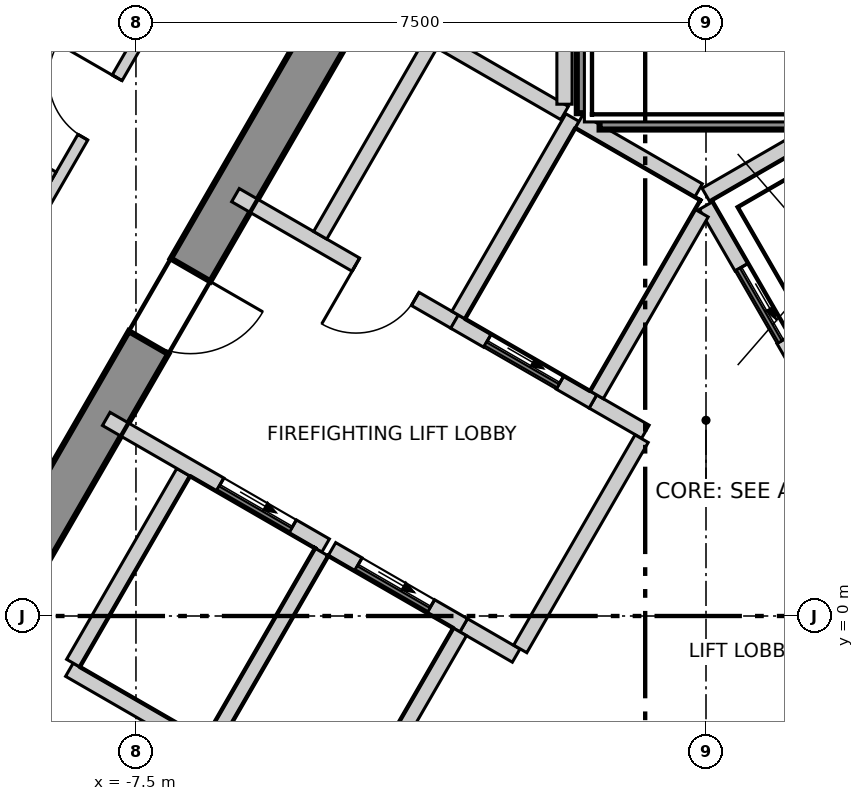
"""IFC4 building model, lengths in metres.
Left out: names, types, materials, properties, quantities, classifications, styles, units other than length and angle.
Written with IfcOpenShell. Run it as: python <this file> out.ifc"""

import sys

from ifc_helpers import new_model, si_unit, direction, frame, frame_2d, origin, place, context, subcontext, project, spatial, polyline, rectangle, outline, extrude, element, fill, save


model = new_model("IFC4")
c1 = context("Model", 3, precision=1e-05, world=origin(), true_north=direction((0.0, 1.0)))
c2 = subcontext(c1, "Body", "Model", "MODEL_VIEW")
j1 = project(units=[si_unit("LENGTHUNIT", "METRE"), si_unit("PLANEANGLEUNIT", "RADIAN")], contexts=[c1])
p1 = place(None, origin())
s1 = spatial("IfcSite", under=j1, at=p1, CompositionType="ELEMENT")
p2 = place(p1, origin())
s2 = spatial("IfcBuilding", under=s1, at=p2, CompositionType="ELEMENT")
p3 = place(p2, frame((0.0, 0.0, 311.5)))
s3 = spatial("IfcBuildingStorey", under=s2, at=p3, CompositionType="ELEMENT", Elevation=311.5)
p4 = place(p3, frame((-1.732, 13.3, -0.3), z_axis=(0.0, 0.0, 1.0), x_axis=(-0.500000539815, -0.866025092122, 0.0)))
e1 = element("IfcWall", 1, at=p4, inside=s3, PredefinedType="SHEAR", context=c2, shape_type="SweptSolid", body=[
    extrude(outline(polyline([(-0.173, -0.3), (1.795, -0.3), (3.763, -0.3), (5.732, -0.3), (7.7, -0.3), (9.668, -0.301), (11.637, -0.301), (13.605, -0.301), (15.573, -0.301), (17.542, -0.301), (19.51, -0.301), (21.478, -0.301), (21.131, 0.3), (19.226, 0.3), (17.321, 0.3), (15.415, 0.3), (13.51, 0.3), (11.605, 0.3), (9.699, 0.3), (7.794, 0.3), (5.889, 0.3), (3.984, 0.3), (2.078, 0.3), (0.173, 0.3), (-0.173, -0.3)])), origin(), (0.0, 0.0, 1.0), 3.6),
])
p5 = place(p4, frame((10.102, 0.0, 0.3)))
e2 = element("IfcOpeningElement", 2, at=p5, cuts=e1, PredefinedType="OPENING", context=c2, shape_type="SweptSolid", body=[
    extrude(rectangle(XDim=1.1, YDim=2.1, at=frame_2d((0.55, 1.05))), frame((0.0, 0.31, 0.0), z_axis=(0.0, -1.0, 0.0), x_axis=(1.0, 0.0, 0.0)), (0.0, 0.0, 1.0), 0.621),
])
p6 = place(p4, frame((16.378, 0.0, 0.3)))
e3 = element("IfcOpeningElement", 3, at=p6, cuts=e1, PredefinedType="OPENING", context=c2, shape_type="SweptSolid", body=[
    extrude(rectangle(XDim=0.9, YDim=2.1, at=frame_2d((0.45, 1.05))), frame((0.0, 0.31, 0.0), z_axis=(0.0, -1.0, 0.0), x_axis=(1.0, 0.0, 0.0)), (0.0, 0.0, 1.0), 0.621),
])
p7 = place(p4, frame((4.106, 0.0, 0.3)))
e4 = element("IfcOpeningElement", 4, at=p7, cuts=e1, PredefinedType="OPENING", context=c2, shape_type="SweptSolid", body=[
    extrude(rectangle(XDim=1.0, YDim=2.1, at=frame_2d((0.5, 1.05))), frame((0.0, 0.31, 0.0), z_axis=(0.0, -1.0, 0.0), x_axis=(1.0, 0.0, 0.0)), (0.0, 0.0, 1.0), 0.621),
])
p8 = place(p3, frame((-2.412, 26.948, 0.0), z_axis=(0.0, 0.0, 1.0), x_axis=(-0.500002044679, -0.866024223285, 0.0)))
e5 = element("IfcWall", 5, at=p8, inside=s3, PredefinedType="ELEMENTEDWALL", context=c2, shape_type="SweptSolid", body=[
    extrude(rectangle(XDim=44.243, YDim=0.2, at=frame_2d((22.122, 0.0))), origin(), (0.0, 0.0, 1.0), 3.3),
])
p9 = place(p8, frame((2.056, 0.0, 0.9)))
e6 = element("IfcOpeningElement", 6, at=p9, cuts=e5, PredefinedType="OPENING", context=c2, shape_type="SweptSolid", body=[
    extrude(rectangle(XDim=3.7, YDim=2.2, at=frame_2d((1.85, 1.1))), frame((0.0, 0.11, 0.0), z_axis=(0.0, -1.0, 0.0), x_axis=(1.0, 0.0, 0.0)), (0.0, 0.0, 1.0), 0.22),
])
p10 = place(p8, frame((7.263, 0.0, 0.9)))
e7 = element("IfcOpeningElement", 7, at=p10, cuts=e5, PredefinedType="OPENING", context=c2, shape_type="SweptSolid", body=[
    extrude(rectangle(XDim=3.7, YDim=2.2, at=frame_2d((1.85, 1.1))), frame((0.0, 0.11, 0.0), z_axis=(0.0, -1.0, 0.0), x_axis=(1.0, 0.0, 0.0)), (0.0, 0.0, 1.0), 0.22),
])
p11 = place(p8, frame((12.471, 0.0, 0.9)))
e8 = element("IfcOpeningElement", 8, at=p11, cuts=e5, PredefinedType="OPENING", context=c2, shape_type="SweptSolid", body=[
    extrude(rectangle(XDim=3.7, YDim=2.2, at=frame_2d((1.85, 1.1))), frame((0.0, 0.11, 0.0), z_axis=(0.0, -1.0, 0.0), x_axis=(1.0, 0.0, 0.0)), (0.0, 0.0, 1.0), 0.22),
])
p12 = place(p8, frame((17.678, 0.0, 0.9)))
e9 = element("IfcOpeningElement", 9, at=p12, cuts=e5, PredefinedType="OPENING", context=c2, shape_type="SweptSolid", body=[
    extrude(rectangle(XDim=3.7, YDim=2.2, at=frame_2d((1.85, 1.1))), frame((0.0, 0.11, 0.0), z_axis=(0.0, -1.0, 0.0), x_axis=(1.0, 0.0, 0.0)), (0.0, 0.0, 1.0), 0.22),
])
p13 = place(p8, frame((22.885, 0.0, 0.9)))
e10 = element("IfcOpeningElement", 10, at=p13, cuts=e5, PredefinedType="OPENING", context=c2, shape_type="SweptSolid", body=[
    extrude(rectangle(XDim=3.7, YDim=2.2, at=frame_2d((1.85, 1.1))), frame((0.0, 0.11, 0.0), z_axis=(0.0, -1.0, 0.0), x_axis=(1.0, 0.0, 0.0)), (0.0, 0.0, 1.0), 0.22),
])
p14 = place(p8, frame((28.092, 0.0, 0.9)))
e11 = element("IfcOpeningElement", 11, at=p14, cuts=e5, PredefinedType="OPENING", context=c2, shape_type="SweptSolid", body=[
    extrude(rectangle(XDim=3.7, YDim=2.2, at=frame_2d((1.85, 1.1))), frame((0.0, 0.11, 0.0), z_axis=(0.0, -1.0, 0.0), x_axis=(1.0, 0.0, 0.0)), (0.0, 0.0, 1.0), 0.22),
])
p15 = place(p8, frame((33.3, 0.0, 0.9)))
e12 = element("IfcOpeningElement", 12, at=p15, cuts=e5, PredefinedType="OPENING", context=c2, shape_type="SweptSolid", body=[
    extrude(rectangle(XDim=3.7, YDim=2.2, at=frame_2d((1.85, 1.1))), frame((0.0, 0.11, 0.0), z_axis=(0.0, -1.0, 0.0), x_axis=(1.0, 0.0, 0.0)), (0.0, 0.0, 1.0), 0.22),
])
p16 = place(p8, frame((38.507, 0.0, 0.9)))
e13 = element("IfcOpeningElement", 13, at=p16, cuts=e5, PredefinedType="OPENING", context=c2, shape_type="SweptSolid", body=[
    extrude(rectangle(XDim=3.7, YDim=2.2, at=frame_2d((1.85, 1.1))), frame((0.0, 0.11, 0.0), z_axis=(0.0, -1.0, 0.0), x_axis=(1.0, 0.0, 0.0)), (0.0, 0.0, 1.0), 0.22),
])
p17 = place(p3, frame((-17.678, -10.12, 0.0), z_axis=(0.0, 0.0, 1.0), x_axis=(0.49998824015, 0.86603219323, 0.0)))
e14 = element("IfcWall", 14, at=p17, inside=s3, PredefinedType="PARTITIONING", context=c2, shape_type="SweptSolid", body=[
    extrude(rectangle(XDim=35.357, YDim=0.15, at=frame_2d((17.678, 0.0))), origin(), (0.0, 0.0, 1.0), 3.3),
])
p18 = place(p17, frame((28.607, 0.0, 0.0)))
e15 = element("IfcOpeningElement", 15, at=p18, cuts=e14, PredefinedType="OPENING", context=c2, shape_type="SweptSolid", body=[
    extrude(rectangle(XDim=1.0, YDim=2.1, at=frame_2d((0.5, 1.05))), frame((0.0, 0.085, 0.0), z_axis=(0.0, -1.0, 0.0), x_axis=(1.0, 0.0, 0.0)), (0.0, 0.0, 1.0), 0.17),
])
p19 = place(p17, frame((13.86, 0.0, 0.0)))
e16 = element("IfcOpeningElement", 16, at=p19, cuts=e14, PredefinedType="OPENING", context=c2, shape_type="SweptSolid", body=[
    extrude(rectangle(XDim=1.0, YDim=2.1, at=frame_2d((0.5, 1.05))), frame((0.0, 0.085, 0.0), z_axis=(0.0, -1.0, 0.0), x_axis=(1.0, 0.0, 0.0)), (0.0, 0.0, 1.0), 0.17),
])
p20 = place(p17, frame((18.96, 0.0, 0.0)))
e17 = element("IfcOpeningElement", 17, at=p20, cuts=e14, PredefinedType="OPENING", context=c2, shape_type="SweptSolid", body=[
    extrude(rectangle(XDim=0.9, YDim=2.1, at=frame_2d((0.45, 1.05))), frame((0.0, 0.085, 0.0), z_axis=(0.0, -1.0, 0.0), x_axis=(1.0, 0.0, 0.0)), (0.0, 0.0, 1.0), 0.17),
])
p21 = place(p17, frame((16.86, 0.0, 0.0)))
e18 = element("IfcOpeningElement", 18, at=p21, cuts=e14, PredefinedType="OPENING", context=c2, shape_type="SweptSolid", body=[
    extrude(rectangle(XDim=0.9, YDim=2.1, at=frame_2d((0.45, 1.05))), frame((0.0, 0.085, 0.0), z_axis=(0.0, -1.0, 0.0), x_axis=(1.0, 0.0, 0.0)), (0.0, 0.0, 1.0), 0.17),
])
p22 = place(p17, frame((8.146, 0.0, 0.0)))
e19 = element("IfcOpeningElement", 19, at=p22, cuts=e14, PredefinedType="OPENING", context=c2, shape_type="SweptSolid", body=[
    extrude(rectangle(XDim=1.0, YDim=2.1, at=frame_2d((0.5, 1.05))), frame((0.0, 0.085, 0.0), z_axis=(0.0, -1.0, 0.0), x_axis=(1.0, 0.0, 0.0)), (0.0, 0.0, 1.0), 0.17),
])
p23 = place(p17, frame((3.038, 0.0, 0.0)))
e20 = element("IfcOpeningElement", 20, at=p23, cuts=e14, PredefinedType="OPENING", context=c2, shape_type="SweptSolid", body=[
    extrude(rectangle(XDim=1.0, YDim=2.1, at=frame_2d((0.5, 1.05))), frame((0.0, 0.085, 0.0), z_axis=(0.0, -1.0, 0.0), x_axis=(1.0, 0.0, 0.0)), (0.0, 0.0, 1.0), 0.17),
])
p24 = place(p3, frame((-10.759, 7.028, 0.0), z_axis=(0.0, 0.0, 1.0), x_axis=(0.866083422639, -0.499899494929, 0.0)))
e21 = element("IfcWall", 21, at=p24, inside=s3, PredefinedType="PARTITIONING", context=c2, shape_type="SweptSolid", body=[
    extrude(rectangle(XDim=2.507, YDim=0.15, at=frame_2d((1.253, 0.0))), origin(), (0.0, 0.0, 1.0), 3.3),
])
p25 = place(p3, frame((0.075, 20.37, 0.0), z_axis=(0.0, 0.0, 1.0), x_axis=(0.500006672087, -0.866021551619, 0.0)))
e22 = element("IfcWall", 22, at=p25, inside=s3, PredefinedType="PARTITIONING", context=c2, shape_type="SweptSolid", body=[
    extrude(rectangle(XDim=35.27, YDim=0.15, at=frame_2d((17.635, 0.0))), origin(), (0.0, 0.0, 1.0), 3.3),
])
p26 = place(p25, frame((31.206, 0.0, 0.0)))
e23 = element("IfcOpeningElement", 23, at=p26, cuts=e22, PredefinedType="OPENING", context=c2, shape_type="SweptSolid", body=[
    extrude(rectangle(XDim=1.0, YDim=2.1, at=frame_2d((0.5, 1.05))), frame((0.0, 0.085, 0.0), z_axis=(0.0, -1.0, 0.0), x_axis=(1.0, 0.0, 0.0)), (0.0, 0.0, 1.0), 0.17),
])
p27 = place(p25, frame((19.968, 0.0, 0.0)))
e24 = element("IfcOpeningElement", 24, at=p27, cuts=e22, PredefinedType="OPENING", context=c2, shape_type="SweptSolid", body=[
    extrude(rectangle(XDim=1.0, YDim=2.1, at=frame_2d((0.5, 1.05))), frame((0.0, 0.085, 0.0), z_axis=(0.0, -1.0, 0.0), x_axis=(1.0, 0.0, 0.0)), (0.0, 0.0, 1.0), 0.17),
])
p28 = place(p25, frame((13.353, 0.0, 0.0)))
e25 = element("IfcOpeningElement", 25, at=p28, cuts=e22, PredefinedType="OPENING", context=c2, shape_type="SweptSolid", body=[
    extrude(rectangle(XDim=1.0, YDim=2.1, at=frame_2d((0.5, 1.05))), frame((0.0, 0.085, 0.0), z_axis=(0.0, -1.0, 0.0), x_axis=(1.0, 0.0, 0.0)), (0.0, 0.0, 1.0), 0.17),
])
p29 = place(p25, frame((7.746, 0.0, 0.0)))
e26 = element("IfcOpeningElement", 26, at=p29, cuts=e22, PredefinedType="OPENING", context=c2, shape_type="SweptSolid", body=[
    extrude(rectangle(XDim=1.0, YDim=2.1, at=frame_2d((0.5, 1.05))), frame((0.0, 0.085, 0.0), z_axis=(0.0, -1.0, 0.0), x_axis=(1.0, 0.0, 0.0)), (0.0, 0.0, 1.0), 0.17),
])
p30 = place(p25, frame((3.038, 0.0, 0.0)))
e27 = element("IfcOpeningElement", 27, at=p30, cuts=e22, PredefinedType="OPENING", context=c2, shape_type="SweptSolid", body=[
    extrude(rectangle(XDim=1.0, YDim=2.1, at=frame_2d((0.5, 1.05))), frame((0.0, 0.085, 0.0), z_axis=(0.0, -1.0, 0.0), x_axis=(1.0, 0.0, 0.0)), (0.0, 0.0, 1.0), 0.17),
])
p31 = place(p3, frame((-8.376, -0.707, 0.0), z_axis=(0.0, 0.0, 1.0), x_axis=(0.866067520717, -0.499927044236, 0.0)))
e28 = element("IfcWall", 28, at=p31, inside=s3, PredefinedType="SOLIDWALL", context=c2, shape_type="SweptSolid", body=[
    extrude(rectangle(XDim=2.1, YDim=0.2, at=frame_2d((1.05, 0.0))), origin(), (0.0, 0.0, 1.0), 3.3),
])
p32 = place(p3, frame((-8.326, -0.62, 0.0), z_axis=(0.0, 0.0, 1.0), x_axis=(0.500023687443, 0.866011727401, 0.0)))
e29 = element("IfcWall", 29, at=p32, inside=s3, PredefinedType="SOLIDWALL", context=c2, shape_type="SweptSolid", body=[
    extrude(rectangle(XDim=2.9, YDim=0.2, at=frame_2d((1.45, 0.0))), origin(), (0.0, 0.0, 1.0), 3.3),
])
p33 = place(p3, frame((-0.002, 5.541, 0.0), z_axis=(0.0, 0.0, 1.0), x_axis=(0.86600155993, 0.500041296494, 0.0)))
e30 = element("IfcWall", 30, at=p33, inside=s3, PredefinedType="SOLIDWALL", context=c2, shape_type="SweptSolid", body=[
    extrude(rectangle(XDim=4.132, YDim=0.2, at=frame_2d((2.066, 0.0))), origin(), (0.0, 0.0, 1.0), 3.3),
])
p34 = place(p3, frame((0.0, 5.4, 0.0), z_axis=(0.0, 0.0, 1.0), x_axis=(0.500103862429, -0.865965430478, 0.0)))
e31 = element("IfcWall", 31, at=p34, inside=s3, PredefinedType="SOLIDWALL", context=c2, shape_type="SweptSolid", body=[
    extrude(rectangle(XDim=2.973, YDim=0.2, at=frame_2d((1.487, 0.0))), origin(), (0.0, 0.0, 1.0), 3.3),
])
p35 = place(p34, frame((0.937, 0.0, 0.0)))
e32 = element("IfcOpeningElement", 32, at=p35, cuts=e31, PredefinedType="OPENING", context=c2, shape_type="SweptSolid", body=[
    extrude(rectangle(XDim=1.1, YDim=2.1, at=frame_2d((0.55, 1.05))), frame((0.0, 0.11, 0.0), z_axis=(0.0, -1.0, 0.0), x_axis=(1.0, 0.0, 0.0)), (0.0, 0.0, 1.0), 0.22),
])
p36 = place(p3, frame((-7.891, 2.593, 0.0), z_axis=(0.0, 0.0, 1.0), x_axis=(0.866070917804, -0.499921159118, 0.0)))
e33 = element("IfcWall", 33, at=p36, inside=s3, PredefinedType="SOLIDWALL", context=c2, shape_type="SweptSolid", body=[
    extrude(rectangle(XDim=3.333, YDim=0.2, at=frame_2d((1.666, 0.0))), origin(), (0.0, 0.0, 1.0), 3.3),
])
p37 = place(p36, frame((1.73, 0.0, 0.0)))
e34 = element("IfcOpeningElement", 34, at=p37, cuts=e33, PredefinedType="OPENING", context=c2, shape_type="SweptSolid", body=[
    extrude(rectangle(XDim=1.1, YDim=2.1, at=frame_2d((0.55, 1.05))), frame((0.0, 0.11, 0.0), z_axis=(0.0, -1.0, 0.0), x_axis=(1.0, 0.0, 0.0)), (0.0, 0.0, 1.0), 0.22),
])
p38 = place(p3, frame((-3.188, -0.122, 0.0), z_axis=(0.0, 0.0, 1.0), x_axis=(0.865705793592, -0.50055317294, 0.0)))
e35 = element("IfcWall", 35, at=p38, inside=s3, PredefinedType="SOLIDWALL", context=c2, shape_type="SweptSolid", body=[
    extrude(rectangle(XDim=0.797, YDim=0.2, at=frame_2d((0.398, 0.0))), origin(), (0.0, 0.0, 1.0), 3.3),
])
p39 = place(p3, frame((-6.191, 5.537, 0.0), z_axis=(0.0, 0.0, 1.0), x_axis=(0.866052607023, -0.499952879648, 0.0)))
e36 = element("IfcWall", 36, at=p39, inside=s3, PredefinedType="SOLIDWALL", context=c2, shape_type="SweptSolid", body=[
    extrude(rectangle(XDim=3.332, YDim=0.2, at=frame_2d((1.666, 0.0))), origin(), (0.0, 0.0, 1.0), 3.3),
])
p40 = place(p39, frame((1.83, 0.0, 0.0)))
e37 = element("IfcOpeningElement", 37, at=p40, cuts=e36, PredefinedType="OPENING", context=c2, shape_type="SweptSolid", body=[
    extrude(rectangle(XDim=0.9, YDim=2.1, at=frame_2d((0.45, 1.05))), frame((0.0, 0.11, 0.0), z_axis=(0.0, -1.0, 0.0), x_axis=(1.0, 0.0, 0.0)), (0.0, 0.0, 1.0), 0.22),
])
p41 = place(p3, frame((-1.488, 2.822, 0.0), z_axis=(0.0, 0.0, 1.0), x_axis=(0.866236612152, -0.499633997809, 0.0)))
e38 = element("IfcWall", 38, at=p41, inside=s3, PredefinedType="SOLIDWALL", context=c2, shape_type="SweptSolid", body=[
    extrude(rectangle(XDim=0.796, YDim=0.2, at=frame_2d((0.398, 0.0))), origin(), (0.0, 0.0, 1.0), 3.3),
])
p42 = place(p3, frame((-5.076, 5.009, 0.0), z_axis=(0.0, 0.0, 1.0), x_axis=(0.50002537861, 0.866010750942, 0.0)))
e39 = element("IfcWall", 39, at=p42, inside=s3, PredefinedType="SOLIDWALL", context=c2, shape_type="SweptSolid", body=[
    extrude(rectangle(XDim=3.0, YDim=0.2, at=frame_2d((1.5, 0.0))), origin(), (0.0, 0.0, 1.0), 3.3),
])
p43 = place(p3, frame((-3.489, 7.557, 0.0), z_axis=(0.0, 0.0, 1.0), x_axis=(0.866012558475, -0.500022248069, 0.0)))
e40 = element("IfcWall", 40, at=p43, inside=s3, PredefinedType="SOLIDWALL", context=c2, shape_type="SweptSolid", body=[
    extrude(rectangle(XDim=1.88, YDim=0.2, at=frame_2d((0.94, 0.0))), origin(), (0.0, 0.0, 1.0), 3.3),
])
p44 = place(p3, frame((-2.444, -0.433, 0.0), z_axis=(0.0, 0.0, 1.0), x_axis=(0.500035624827, 0.866004834804, 0.0)))
e41 = element("IfcWall", 41, at=p44, inside=s3, PredefinedType="SOLIDWALL", context=c2, shape_type="SweptSolid", body=[
    extrude(rectangle(XDim=3.194, YDim=0.2, at=frame_2d((1.597, 0.0))), origin(), (0.0, 0.0, 1.0), 3.3),
])
p45 = place(p3, frame((-6.507, -1.67, 0.0), z_axis=(0.0, 0.0, 1.0), x_axis=(0.50012328804, 0.865954211699, 0.0)))
e42 = element("IfcWall", 42, at=p45, inside=s3, PredefinedType="SOLIDWALL", context=c2, shape_type="SweptSolid", body=[
    extrude(rectangle(XDim=2.9, YDim=0.2, at=frame_2d((1.45, 0.0))), origin(), (0.0, 0.0, 1.0), 3.3),
])
p46 = place(p3, frame((-4.922, 0.879, 0.0), z_axis=(0.0, 0.0, 1.0), x_axis=(0.866073918653, -0.499915960366, 0.0)))
e43 = element("IfcWall", 43, at=p46, inside=s3, PredefinedType="SOLIDWALL", context=c2, shape_type="SweptSolid", body=[
    extrude(rectangle(XDim=2.002, YDim=0.2, at=frame_2d((1.001, 0.0))), origin(), (0.0, 0.0, 1.0), 3.3),
])
p47 = place(p46, frame((0.402, 0.0, 0.0)))
e44 = element("IfcOpeningElement", 44, at=p47, cuts=e43, PredefinedType="OPENING", context=c2, shape_type="SweptSolid", body=[
    extrude(rectangle(XDim=1.1, YDim=2.1, at=frame_2d((0.55, 1.05))), frame((0.0, 0.11, 0.0), z_axis=(0.0, -1.0, 0.0), x_axis=(1.0, 0.0, 0.0)), (0.0, 0.0, 1.0), 0.22),
])
p48 = place(p3, frame((-4.619, -2.6, 0.0), z_axis=(0.0, 0.0, 1.0), x_axis=(0.50009492287, 0.865970593103, 0.0)))
e45 = element("IfcWall", 45, at=p48, inside=s3, PredefinedType="SOLIDWALL", context=c2, shape_type="SweptSolid", body=[
    extrude(rectangle(XDim=2.761, YDim=0.2, at=frame_2d((1.381, 0.0))), origin(), (0.0, 0.0, 1.0), 3.3),
])
p49 = place(p3, frame((-3.309, 3.873, 0.0), z_axis=(0.0, 0.0, 1.0), x_axis=(0.866098583652, -0.499873227325, 0.0)))
e46 = element("IfcWall", 46, at=p49, inside=s3, PredefinedType="SOLIDWALL", context=c2, shape_type="SweptSolid", body=[
    extrude(rectangle(XDim=2.103, YDim=0.2, at=frame_2d((1.051, 0.0))), origin(), (0.0, 0.0, 1.0), 3.3),
])
p50 = place(p49, frame((0.502, 0.0, 0.0)))
e47 = element("IfcOpeningElement", 47, at=p50, cuts=e46, PredefinedType="OPENING", context=c2, shape_type="SweptSolid", body=[
    extrude(rectangle(XDim=1.1, YDim=2.1, at=frame_2d((0.55, 1.05))), frame((0.0, 0.11, 0.0), z_axis=(0.0, -1.0, 0.0), x_axis=(1.0, 0.0, 0.0)), (0.0, 0.0, 1.0), 0.22),
])
p51 = place(p3, frame((-3.257, 3.959, 0.0), z_axis=(0.0, 0.0, 1.0), x_axis=(0.50002537861, 0.866010750942, 0.0)))
e48 = element("IfcWall", 48, at=p51, inside=s3, PredefinedType="SOLIDWALL", context=c2, shape_type="SweptSolid", body=[
    extrude(rectangle(XDim=3.0, YDim=0.2, at=frame_2d((1.5, 0.0))), origin(), (0.0, 0.0, 1.0), 3.3),
])
p52 = place(p3, frame((-1.67, 6.507, 0.0), z_axis=(0.0, 0.0, 1.0), x_axis=(0.865941441609, -0.500145398563, 0.0)))
e49 = element("IfcWall", 49, at=p52, inside=s3, PredefinedType="SOLIDWALL", context=c2, shape_type="SweptSolid", body=[
    extrude(rectangle(XDim=1.815, YDim=0.2, at=frame_2d((0.908, 0.0))), origin(), (0.0, 0.0, 1.0), 3.3),
])
p53 = place(p3, frame((-1.438, 2.909, 0.0), z_axis=(0.0, 0.0, 1.0), x_axis=(0.499829630636, 0.866123744241, 0.0)))
e50 = element("IfcWall", 50, at=p53, inside=s3, PredefinedType="SOLIDWALL", context=c2, shape_type="SweptSolid", body=[
    extrude(rectangle(XDim=2.761, YDim=0.2, at=frame_2d((1.38, 0.0))), origin(), (0.0, 0.0, 1.0), 3.3),
])
p54 = place(p3, frame((-1.862, 6.733, 0.0), z_axis=(0.0, 0.0, 1.0), x_axis=(0.0, 1.0, 0.0)))
e51 = element("IfcWall", 51, at=p54, inside=s3, PredefinedType="SOLIDWALL", context=c2, shape_type="SweptSolid", body=[
    extrude(rectangle(XDim=6.301, YDim=0.2, at=frame_2d((3.15, 0.0))), origin(), (0.0, 0.0, 1.0), 3.3),
])
p55 = place(p3, frame((-1.4, 6.5, 0.0), z_axis=(0.0, 0.0, 1.0), x_axis=(1.0, 0.0, 0.0)))
e52 = element("IfcWall", 52, at=p55, inside=s3, PredefinedType="SOLIDWALL", context=c2, shape_type="SweptSolid", body=[
    extrude(rectangle(XDim=2.8, YDim=0.2, at=frame_2d((1.4, 0.0))), origin(), (0.0, 0.0, 1.0), 3.3),
])
p56 = place(p3, frame((-1.6, 6.615, 0.0), z_axis=(0.0, 0.0, 1.0), x_axis=(0.0, 1.0, 0.0)))
e53 = element("IfcWall", 53, at=p56, inside=s3, PredefinedType="SOLIDWALL", context=c2, shape_type="SweptSolid", body=[
    extrude(rectangle(XDim=6.665, YDim=0.2, at=frame_2d((3.333, 0.0))), origin(), (0.0, 0.0, 1.0), 3.3),
])
p57 = place(p35, origin())
e54 = element("IfcDoor", 54, at=p57, inside=s3, OperationType="SLIDING_TO_LEFT", PredefinedType="DOOR", context=c2, shape_type="SweptSolid", body=[
    extrude(rectangle(XDim=1.1, YDim=2.1, at=frame_2d((0.55, 1.05))), frame((0.0, 0.025, 0.0), z_axis=(0.0, -1.0, 0.0), x_axis=(1.0, 0.0, 0.0)), (0.0, 0.0, 1.0), 0.05),
])
fill(e32, e54)
p58 = place(p47, origin())
e55 = element("IfcDoor", 55, at=p58, inside=s3, OperationType="SLIDING_TO_LEFT", PredefinedType="DOOR", context=c2, shape_type="SweptSolid", body=[
    extrude(rectangle(XDim=1.1, YDim=2.1, at=frame_2d((0.55, 1.05))), frame((0.0, 0.025, 0.0), z_axis=(0.0, -1.0, 0.0), x_axis=(1.0, 0.0, 0.0)), (0.0, 0.0, 1.0), 0.05),
])
fill(e44, e55)
p59 = place(p50, origin())
e56 = element("IfcDoor", 56, at=p59, inside=s3, OperationType="SLIDING_TO_LEFT", PredefinedType="DOOR", context=c2, shape_type="SweptSolid", body=[
    extrude(rectangle(XDim=1.1, YDim=2.1, at=frame_2d((0.55, 1.05))), frame((0.0, 0.025, 0.0), z_axis=(0.0, -1.0, 0.0), x_axis=(1.0, 0.0, 0.0)), (0.0, 0.0, 1.0), 0.05),
])
fill(e47, e56)
p60 = place(p37, origin())
e57 = element("IfcDoor", 57, at=p60, inside=s3, OperationType="SLIDING_TO_LEFT", PredefinedType="DOOR", context=c2, shape_type="SweptSolid", body=[
    extrude(rectangle(XDim=1.1, YDim=2.1, at=frame_2d((0.55, 1.05))), frame((0.0, 0.025, 0.0), z_axis=(0.0, -1.0, 0.0), x_axis=(1.0, 0.0, 0.0)), (0.0, 0.0, 1.0), 0.05),
])
fill(e34, e57)
p61 = place(p40, origin())
e58 = element("IfcDoor", 58, at=p61, inside=s3, OperationType="SINGLE_SWING_LEFT", PredefinedType="DOOR", context=c2, shape_type="SweptSolid", body=[
    extrude(rectangle(XDim=0.9, YDim=2.1, at=frame_2d((0.45, 1.05))), frame((0.0, 0.025, 0.0), z_axis=(0.0, -1.0, 0.0), x_axis=(1.0, 0.0, 0.0)), (0.0, 0.0, 1.0), 0.05),
])
fill(e37, e58)
p62 = place(p20, origin())
e59 = element("IfcDoor", 59, at=p62, inside=s3, OperationType="SINGLE_SWING_LEFT", PredefinedType="DOOR", context=c2, shape_type="SweptSolid", body=[
    extrude(rectangle(XDim=0.9, YDim=2.1, at=frame_2d((0.45, 1.05))), frame((0.0, 0.025, 0.0), z_axis=(0.0, -1.0, 0.0), x_axis=(1.0, 0.0, 0.0)), (0.0, 0.0, 1.0), 0.05),
])
fill(e17, e59)
p63 = place(p5, origin())
e60 = element("IfcDoor", 60, at=p63, inside=s3, OperationType="SINGLE_SWING_RIGHT", PredefinedType="DOOR", context=c2, shape_type="SweptSolid", body=[
    extrude(rectangle(XDim=1.1, YDim=2.1, at=frame_2d((0.55, 1.05))), frame((0.0, 0.025, 0.0), z_axis=(0.0, -1.0, 0.0), x_axis=(1.0, 0.0, 0.0)), (0.0, 0.0, 1.0), 0.05),
])
fill(e2, e60)
save(model, sys.argv[1])
